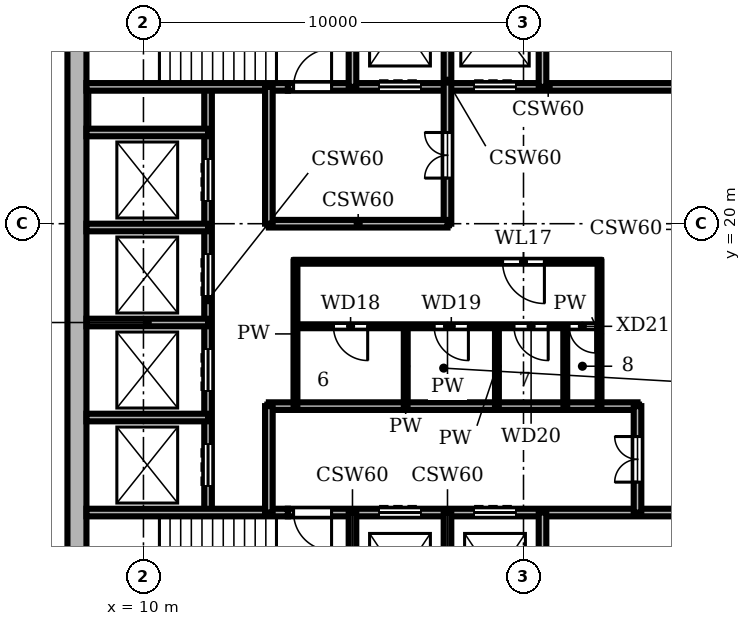
"""IFC4 building model, lengths in metres.
Left out: names, types, materials, properties, quantities, classifications, styles, units other than length and angle.
Written with IfcOpenShell. Run it as: python <this file> out.ifc"""

import sys

from ifc_helpers import new_model, si_unit, direction, frame, frame_2d, origin, place, context, subcontext, project, spatial, rectangle, extrude, element, fill, save


model = new_model("IFC4")
c1 = context("Model", 3, precision=1e-05, world=origin(), true_north=direction((0.0, 1.0)))
c2 = subcontext(c1, "Body", "Model", "MODEL_VIEW")
j1 = project(units=[si_unit("LENGTHUNIT", "METRE"), si_unit("PLANEANGLEUNIT", "RADIAN")], contexts=[c1])
p1 = place(None, origin())
s1 = spatial("IfcSite", under=j1, at=p1, CompositionType="ELEMENT")
p2 = place(p1, origin())
s2 = spatial("IfcBuilding", under=s1, at=p2, CompositionType="ELEMENT")
p3 = place(p2, frame((0.0, 0.0, 333.3)))
s3 = spatial("IfcBuildingStorey", under=s2, at=p3, CompositionType="ELEMENT", Elevation=333.3)
p4 = place(p3, frame((8.25, 27.5, 0.0), z_axis=(0.0, 0.0, 1.0), x_axis=(0.0, -1.0, 0.0)))
e1 = element("IfcWall", 1, at=p4, inside=s3, PredefinedType="SHEAR", context=c2, shape_type="SweptSolid", body=[
    extrude(rectangle(XDim=19.0, YDim=0.5, at=frame_2d((9.5, 0.0))), origin(), (0.0, 0.0, 1.0), 3.9),
])
p5 = place(p3, frame((8.5, 12.4, 0.0), z_axis=(0.0, 0.0, 1.0), x_axis=(1.0, 0.0, 0.0)))
e2 = element("IfcWall", 2, at=p5, inside=s3, PredefinedType="SHEAR", context=c2, shape_type="SweptSolid", body=[
    extrude(rectangle(XDim=5.3, YDim=0.2, at=frame_2d((2.65, 0.0))), origin(), (0.0, 0.0, 1.0), 3.58),
])
p6 = place(p3, frame((13.8, 12.4, 0.0), z_axis=(0.0, 0.0, 1.0), x_axis=(1.0, 0.0, 0.0)))
e3 = element("IfcWall", 3, at=p6, inside=s3, PredefinedType="SHEAR", context=c2, shape_type="SweptSolid", body=[
    extrude(rectangle(XDim=13.7, YDim=0.2, at=frame_2d((6.85, 0.0))), origin(), (0.0, 0.0, 1.0), 3.58),
])
p7 = place(p6, frame((2.4, 0.0, 0.0)))
e4 = element("IfcOpeningElement", 4, at=p7, cuts=e3, PredefinedType="OPENING", context=c2, shape_type="SweptSolid", body=[
    extrude(rectangle(XDim=1.1, YDim=2.1, at=frame_2d((0.55, 1.05))), frame((0.0, 0.11, 0.0), z_axis=(0.0, -1.0, 0.0), x_axis=(1.0, 0.0, 0.0)), (0.0, 0.0, 1.0), 0.22),
])
p8 = place(p6, frame((4.9, 0.0, 0.0)))
e5 = element("IfcOpeningElement", 5, at=p8, cuts=e3, PredefinedType="OPENING", context=c2, shape_type="SweptSolid", body=[
    extrude(rectangle(XDim=1.1, YDim=2.1, at=frame_2d((0.55, 1.05))), frame((0.0, 0.11, 0.0), z_axis=(0.0, -1.0, 0.0), x_axis=(1.0, 0.0, 0.0)), (0.0, 0.0, 1.0), 0.22),
])
p9 = place(p6, frame((0.15, 0.0, 0.0)))
e6 = element("IfcOpeningElement", 6, at=p9, cuts=e3, PredefinedType="OPENING", context=c2, shape_type="SweptSolid", body=[
    extrude(rectangle(XDim=1.0, YDim=2.1, at=frame_2d((0.5, 1.05))), frame((0.0, 0.11, 0.0), z_axis=(0.0, -1.0, 0.0), x_axis=(1.0, 0.0, 0.0)), (0.0, 0.0, 1.0), 0.22),
])
p10 = place(p3, frame((8.5, 14.9, 0.0), z_axis=(0.0, 0.0, 1.0), x_axis=(1.0, 0.0, 0.0)))
e7 = element("IfcWall", 7, at=p10, inside=s3, PredefinedType="SHEAR", context=c2, shape_type="SweptSolid", body=[
    extrude(rectangle(XDim=3.2, YDim=0.2, at=frame_2d((1.6, 0.0))), origin(), (0.0, 0.0, 1.0), 3.58),
])
p11 = place(p3, frame((13.3, 15.2, 0.0), z_axis=(0.0, 0.0, 1.0), x_axis=(1.0, 0.0, 0.0)))
e8 = element("IfcWall", 8, at=p11, inside=s3, PredefinedType="SHEAR", context=c2, shape_type="SweptSolid", body=[
    extrude(rectangle(XDim=9.7, YDim=0.2, at=frame_2d((4.85, 0.0))), origin(), (0.0, 0.0, 1.0), 3.58),
])
p12 = place(p3, frame((14.0, 17.3, 0.0), z_axis=(0.0, 0.0, 1.0), x_axis=(1.0, 0.0, 0.0)))
e9 = element("IfcWall", 9, at=p12, inside=s3, PredefinedType="PARTITIONING", context=c2, shape_type="SweptSolid", body=[
    extrude(rectangle(XDim=8.0, YDim=0.1, at=frame_2d((4.0, 0.0))), origin(), (0.0, 0.0, 1.0), 3.58),
])
p13 = place(p12, frame((1.0, 0.0, 0.0)))
e10 = element("IfcOpeningElement", 10, at=p13, cuts=e9, PredefinedType="OPENING", context=c2, shape_type="SweptSolid", body=[
    extrude(rectangle(XDim=0.9, YDim=2.1, at=frame_2d((0.45, 1.05))), frame((0.0, 0.06, 0.0), z_axis=(0.0, -1.0, 0.0), x_axis=(1.0, 0.0, 0.0)), (0.0, 0.0, 1.0), 0.12),
])
p14 = place(p12, frame((3.65, 0.0, 0.0)))
e11 = element("IfcOpeningElement", 11, at=p14, cuts=e9, PredefinedType="OPENING", context=c2, shape_type="SweptSolid", body=[
    extrude(rectangle(XDim=0.9, YDim=2.1, at=frame_2d((0.45, 1.05))), frame((0.0, 0.06, 0.0), z_axis=(0.0, -1.0, 0.0), x_axis=(1.0, 0.0, 0.0)), (0.0, 0.0, 1.0), 0.12),
])
p15 = place(p12, frame((5.75, 0.0, 0.0)))
e12 = element("IfcOpeningElement", 12, at=p15, cuts=e9, PredefinedType="OPENING", context=c2, shape_type="SweptSolid", body=[
    extrude(rectangle(XDim=0.9, YDim=2.1, at=frame_2d((0.45, 1.05))), frame((0.0, 0.06, 0.0), z_axis=(0.0, -1.0, 0.0), x_axis=(1.0, 0.0, 0.0)), (0.0, 0.0, 1.0), 0.12),
])
p16 = place(p12, frame((7.2, 0.0, 0.0)))
e13 = element("IfcOpeningElement", 13, at=p16, cuts=e9, PredefinedType="OPENING", context=c2, shape_type="SweptSolid", body=[
    extrude(rectangle(XDim=0.7, YDim=2.1, at=frame_2d((0.35, 1.05))), frame((0.0, 0.06, 0.0), z_axis=(0.0, -1.0, 0.0), x_axis=(1.0, 0.0, 0.0)), (0.0, 0.0, 1.0), 0.12),
])
p17 = place(p3, frame((8.5, 17.4, 0.0), z_axis=(0.0, 0.0, 1.0), x_axis=(1.0, 0.0, 0.0)))
e14 = element("IfcWall", 14, at=p17, inside=s3, PredefinedType="SHEAR", context=c2, shape_type="SweptSolid", body=[
    extrude(rectangle(XDim=3.2, YDim=0.2, at=frame_2d((1.6, 0.0))), origin(), (0.0, 0.0, 1.0), 3.58),
])
p18 = place(p3, frame((14.0, 19.0, 0.0), z_axis=(0.0, 0.0, 1.0), x_axis=(1.0, 0.0, 0.0)))
e15 = element("IfcWall", 15, at=p18, inside=s3, PredefinedType="PARTITIONING", context=c2, shape_type="SweptSolid", body=[
    extrude(rectangle(XDim=8.0, YDim=0.1, at=frame_2d((4.0, 0.0))), origin(), (0.0, 0.0, 1.0), 3.58),
])
p19 = place(p18, frame((5.45, 0.0, 0.0)))
e16 = element("IfcOpeningElement", 16, at=p19, cuts=e15, PredefinedType="OPENING", context=c2, shape_type="SweptSolid", body=[
    extrude(rectangle(XDim=1.1, YDim=2.1, at=frame_2d((0.55, 1.05))), frame((0.0, 0.06, 0.0), z_axis=(0.0, -1.0, 0.0), x_axis=(1.0, 0.0, 0.0)), (0.0, 0.0, 1.0), 0.12),
])
p20 = place(p3, frame((8.5, 19.9, 0.0), z_axis=(0.0, 0.0, 1.0), x_axis=(1.0, 0.0, 0.0)))
e17 = element("IfcWall", 17, at=p20, inside=s3, PredefinedType="SHEAR", context=c2, shape_type="SweptSolid", body=[
    extrude(rectangle(XDim=3.2, YDim=0.2, at=frame_2d((1.6, 0.0))), origin(), (0.0, 0.0, 1.0), 3.58),
])
p21 = place(p3, frame((13.3, 20.0, 0.0), z_axis=(0.0, 0.0, 1.0), x_axis=(1.0, 0.0, 0.0)))
e18 = element("IfcWall", 18, at=p21, inside=s3, PredefinedType="SHEAR", context=c2, shape_type="SweptSolid", body=[
    extrude(rectangle(XDim=4.7, YDim=0.2, at=frame_2d((2.35, 0.0))), origin(), (0.0, 0.0, 1.0), 3.58),
])
p22 = place(p3, frame((8.5, 22.4, 0.0), z_axis=(0.0, 0.0, 1.0), x_axis=(1.0, 0.0, 0.0)))
e19 = element("IfcWall", 19, at=p22, inside=s3, PredefinedType="SHEAR", context=c2, shape_type="SweptSolid", body=[
    extrude(rectangle(XDim=3.2, YDim=0.2, at=frame_2d((1.6, 0.0))), origin(), (0.0, 0.0, 1.0), 3.58),
])
p23 = place(p3, frame((8.5, 23.6, 0.0), z_axis=(0.0, 0.0, 1.0), x_axis=(1.0, 0.0, 0.0)))
e20 = element("IfcWall", 20, at=p23, inside=s3, PredefinedType="SHEAR", context=c2, shape_type="SweptSolid", body=[
    extrude(rectangle(XDim=5.3, YDim=0.2, at=frame_2d((2.65, 0.0))), origin(), (0.0, 0.0, 1.0), 3.58),
])
p24 = place(p3, frame((13.8, 23.6, 0.0), z_axis=(0.0, 0.0, 1.0), x_axis=(1.0, 0.0, 0.0)))
e21 = element("IfcWall", 21, at=p24, inside=s3, PredefinedType="SHEAR", context=c2, shape_type="SweptSolid", body=[
    extrude(rectangle(XDim=13.7, YDim=0.2, at=frame_2d((6.85, 0.0))), origin(), (0.0, 0.0, 1.0), 3.58),
])
p25 = place(p24, frame((2.4, 0.0, 0.0)))
e22 = element("IfcOpeningElement", 22, at=p25, cuts=e21, PredefinedType="OPENING", context=c2, shape_type="SweptSolid", body=[
    extrude(rectangle(XDim=1.1, YDim=2.1, at=frame_2d((0.55, 1.05))), frame((0.0, 0.11, 0.0), z_axis=(0.0, -1.0, 0.0), x_axis=(1.0, 0.0, 0.0)), (0.0, 0.0, 1.0), 0.22),
])
p26 = place(p24, frame((4.9, 0.0, 0.0)))
e23 = element("IfcOpeningElement", 23, at=p26, cuts=e21, PredefinedType="OPENING", context=c2, shape_type="SweptSolid", body=[
    extrude(rectangle(XDim=1.1, YDim=2.1, at=frame_2d((0.55, 1.05))), frame((0.0, 0.11, 0.0), z_axis=(0.0, -1.0, 0.0), x_axis=(1.0, 0.0, 0.0)), (0.0, 0.0, 1.0), 0.22),
])
p27 = place(p24, frame((0.15, 0.0, 0.0)))
e24 = element("IfcOpeningElement", 24, at=p27, cuts=e21, PredefinedType="OPENING", context=c2, shape_type="SweptSolid", body=[
    extrude(rectangle(XDim=1.0, YDim=2.1, at=frame_2d((0.5, 1.05))), frame((0.0, 0.11, 0.0), z_axis=(0.0, -1.0, 0.0), x_axis=(1.0, 0.0, 0.0)), (0.0, 0.0, 1.0), 0.22),
])
p28 = place(p3, frame((11.7, 12.4, 0.0), z_axis=(0.0, 0.0, 1.0), x_axis=(0.0, 1.0, 0.0)))
e25 = element("IfcWall", 25, at=p28, inside=s3, PredefinedType="SHEAR", context=c2, shape_type="SweptSolid", body=[
    extrude(rectangle(XDim=11.2, YDim=0.2, at=frame_2d((5.6, 0.0))), origin(), (0.0, 0.0, 1.0), 3.58),
])
p29 = place(p28, frame((0.7, 0.0, 0.0)))
e26 = element("IfcOpeningElement", 26, at=p29, cuts=e25, PredefinedType="OPENING", context=c2, shape_type="SweptSolid", body=[
    extrude(rectangle(XDim=1.1, YDim=2.1, at=frame_2d((0.55, 1.05))), frame((0.0, 0.11, 0.0), z_axis=(0.0, -1.0, 0.0), x_axis=(1.0, 0.0, 0.0)), (0.0, 0.0, 1.0), 0.22),
])
p30 = place(p28, frame((3.2, 0.0, 0.0)))
e27 = element("IfcOpeningElement", 27, at=p30, cuts=e25, PredefinedType="OPENING", context=c2, shape_type="SweptSolid", body=[
    extrude(rectangle(XDim=1.1, YDim=2.1, at=frame_2d((0.55, 1.05))), frame((0.0, 0.11, 0.0), z_axis=(0.0, -1.0, 0.0), x_axis=(1.0, 0.0, 0.0)), (0.0, 0.0, 1.0), 0.22),
])
p31 = place(p28, frame((5.7, 0.0, 0.0)))
e28 = element("IfcOpeningElement", 28, at=p31, cuts=e25, PredefinedType="OPENING", context=c2, shape_type="SweptSolid", body=[
    extrude(rectangle(XDim=1.1, YDim=2.1, at=frame_2d((0.55, 1.05))), frame((0.0, 0.11, 0.0), z_axis=(0.0, -1.0, 0.0), x_axis=(1.0, 0.0, 0.0)), (0.0, 0.0, 1.0), 0.22),
])
p32 = place(p28, frame((8.2, 0.0, 0.0)))
e29 = element("IfcOpeningElement", 29, at=p32, cuts=e25, PredefinedType="OPENING", context=c2, shape_type="SweptSolid", body=[
    extrude(rectangle(XDim=1.1, YDim=2.1, at=frame_2d((0.55, 1.05))), frame((0.0, 0.11, 0.0), z_axis=(0.0, -1.0, 0.0), x_axis=(1.0, 0.0, 0.0)), (0.0, 0.0, 1.0), 0.22),
])
p33 = place(p3, frame((13.3, 12.4, 0.0), z_axis=(0.0, 0.0, 1.0), x_axis=(0.0, 1.0, 0.0)))
e30 = element("IfcWall", 30, at=p33, inside=s3, PredefinedType="SHEAR", context=c2, shape_type="SweptSolid", body=[
    extrude(rectangle(XDim=2.8, YDim=0.2, at=frame_2d((1.4, 0.0))), origin(), (0.0, 0.0, 1.0), 3.58),
])
p34 = place(p3, frame((13.3, 20.0, 0.0), z_axis=(0.0, 0.0, 1.0), x_axis=(0.0, 1.0, 0.0)))
e31 = element("IfcWall", 31, at=p34, inside=s3, PredefinedType="SHEAR", context=c2, shape_type="SweptSolid", body=[
    extrude(rectangle(XDim=3.6, YDim=0.2, at=frame_2d((1.8, 0.0))), origin(), (0.0, 0.0, 1.0), 3.58),
])
p35 = place(p3, frame((14.0, 15.2, 0.0), z_axis=(0.0, 0.0, 1.0), x_axis=(0.0, 1.0, 0.0)))
e32 = element("IfcWall", 32, at=p35, inside=s3, PredefinedType="PARTITIONING", context=c2, shape_type="SweptSolid", body=[
    extrude(rectangle(XDim=3.8, YDim=0.1, at=frame_2d((1.9, 0.0))), origin(), (0.0, 0.0, 1.0), 3.58),
])
for number, where, z_axis, x_axis in (
    (33, (15.5, 8.5, 0.0), (0.0, 0.0, 1.0), (0.0, 1.0, 0.0)),
    (34, (15.5, 23.6, 0.0), (0.0, 0.0, 1.0), (0.0, 1.0, 0.0)),
):
    element("IfcWall", number, at=place(p3, frame(where, z_axis=z_axis, x_axis=x_axis)), inside=s3, PredefinedType="SHEAR", context=c2, shape_type="SweptSolid", body=[
        extrude(rectangle(XDim=3.9, YDim=0.2, at=frame_2d((1.95, 0.0))), origin(), (0.0, 0.0, 1.0), 3.58),
    ])
p36 = place(p3, frame((16.9, 15.2, 0.0), z_axis=(0.0, 0.0, 1.0), x_axis=(0.0, 1.0, 0.0)))
e35 = element("IfcWall", 35, at=p36, inside=s3, PredefinedType="PARTITIONING", context=c2, shape_type="SweptSolid", body=[
    extrude(rectangle(XDim=2.1, YDim=0.1, at=frame_2d((1.05, 0.0))), origin(), (0.0, 0.0, 1.0), 3.58),
])
p37 = place(p3, frame((18.0, 8.5, 0.0), z_axis=(0.0, 0.0, 1.0), x_axis=(0.0, 1.0, 0.0)))
e36 = element("IfcWall", 36, at=p37, inside=s3, PredefinedType="SHEAR", context=c2, shape_type="SweptSolid", body=[
    extrude(rectangle(XDim=3.9, YDim=0.2, at=frame_2d((1.95, 0.0))), origin(), (0.0, 0.0, 1.0), 3.58),
])
p38 = place(p3, frame((18.0, 20.0, 0.0), z_axis=(0.0, 0.0, 1.0), x_axis=(0.0, 1.0, 0.0)))
e37 = element("IfcWall", 37, at=p38, inside=s3, PredefinedType="SHEAR", context=c2, shape_type="SweptSolid", body=[
    extrude(rectangle(XDim=7.5, YDim=0.2, at=frame_2d((3.75, 0.0))), origin(), (0.0, 0.0, 1.0), 3.58),
])
p39 = place(p38, frame((1.2, 0.0, 0.0)))
e38 = element("IfcOpeningElement", 38, at=p39, cuts=e37, PredefinedType="OPENING", context=c2, shape_type="SweptSolid", body=[
    extrude(rectangle(XDim=1.2, YDim=2.1, at=frame_2d((0.6, 1.05))), frame((0.0, 0.11, 0.0), z_axis=(0.0, -1.0, 0.0), x_axis=(1.0, 0.0, 0.0)), (0.0, 0.0, 1.0), 0.22),
])
p40 = place(p3, frame((19.3, 15.2, 0.0), z_axis=(0.0, 0.0, 1.0), x_axis=(0.0, 1.0, 0.0)))
e39 = element("IfcWall", 39, at=p40, inside=s3, PredefinedType="PARTITIONING", context=c2, shape_type="SweptSolid", body=[
    extrude(rectangle(XDim=2.1, YDim=0.1, at=frame_2d((1.05, 0.0))), origin(), (0.0, 0.0, 1.0), 3.58),
])
for number, where, z_axis, x_axis in (
    (40, (20.5, 8.5, 0.0), (0.0, 0.0, 1.0), (0.0, 1.0, 0.0)),
    (41, (20.5, 23.6, 0.0), (0.0, 0.0, 1.0), (0.0, 1.0, 0.0)),
):
    element("IfcWall", number, at=place(p3, frame(where, z_axis=z_axis, x_axis=x_axis)), inside=s3, PredefinedType="SHEAR", context=c2, shape_type="SweptSolid", body=[
        extrude(rectangle(XDim=3.9, YDim=0.2, at=frame_2d((1.95, 0.0))), origin(), (0.0, 0.0, 1.0), 3.58),
    ])
p41 = place(p3, frame((21.1, 15.2, 0.0), z_axis=(0.0, 0.0, 1.0), x_axis=(0.0, 1.0, 0.0)))
e42 = element("IfcWall", 42, at=p41, inside=s3, PredefinedType="PARTITIONING", context=c2, shape_type="SweptSolid", body=[
    extrude(rectangle(XDim=2.1, YDim=0.1, at=frame_2d((1.05, 0.0))), origin(), (0.0, 0.0, 1.0), 3.58),
])
p42 = place(p3, frame((22.0, 15.2, 0.0), z_axis=(0.0, 0.0, 1.0), x_axis=(0.0, 1.0, 0.0)))
e43 = element("IfcWall", 43, at=p42, inside=s3, PredefinedType="PARTITIONING", context=c2, shape_type="SweptSolid", body=[
    extrude(rectangle(XDim=3.8, YDim=0.1, at=frame_2d((1.9, 0.0))), origin(), (0.0, 0.0, 1.0), 3.58),
])
p43 = place(p3, frame((23.0, 12.4, 0.0), z_axis=(0.0, 0.0, 1.0), x_axis=(0.0, 1.0, 0.0)))
e44 = element("IfcWall", 44, at=p43, inside=s3, PredefinedType="SHEAR", context=c2, shape_type="SweptSolid", body=[
    extrude(rectangle(XDim=2.8, YDim=0.2, at=frame_2d((1.4, 0.0))), origin(), (0.0, 0.0, 1.0), 3.58),
])
p44 = place(p43, frame((0.8, 0.0, 0.0)))
e45 = element("IfcOpeningElement", 45, at=p44, cuts=e44, PredefinedType="OPENING", context=c2, shape_type="SweptSolid", body=[
    extrude(rectangle(XDim=1.2, YDim=2.1, at=frame_2d((0.6, 1.05))), frame((0.0, 0.11, 0.0), z_axis=(0.0, -1.0, 0.0), x_axis=(1.0, 0.0, 0.0)), (0.0, 0.0, 1.0), 0.22),
])
p45 = place(p29, origin())
e46 = element("IfcDoor", 46, at=p45, inside=s3, OperationType="DOUBLE_DOOR_SLIDING", PredefinedType="DOOR", context=c2, shape_type="SweptSolid", body=[
    extrude(rectangle(XDim=1.1, YDim=2.1, at=frame_2d((0.55, 1.05))), frame((0.0, 0.025, 0.0), z_axis=(0.0, -1.0, 0.0), x_axis=(1.0, 0.0, 0.0)), (0.0, 0.0, 1.0), 0.05),
])
fill(e26, e46)
p46 = place(p30, origin())
e47 = element("IfcDoor", 47, at=p46, inside=s3, OperationType="DOUBLE_DOOR_SLIDING", PredefinedType="DOOR", context=c2, shape_type="SweptSolid", body=[
    extrude(rectangle(XDim=1.1, YDim=2.1, at=frame_2d((0.55, 1.05))), frame((0.0, 0.025, 0.0), z_axis=(0.0, -1.0, 0.0), x_axis=(1.0, 0.0, 0.0)), (0.0, 0.0, 1.0), 0.05),
])
fill(e27, e47)
p47 = place(p31, origin())
e48 = element("IfcDoor", 48, at=p47, inside=s3, OperationType="DOUBLE_DOOR_SLIDING", PredefinedType="DOOR", context=c2, shape_type="SweptSolid", body=[
    extrude(rectangle(XDim=1.1, YDim=2.1, at=frame_2d((0.55, 1.05))), frame((0.0, 0.025, 0.0), z_axis=(0.0, -1.0, 0.0), x_axis=(1.0, 0.0, 0.0)), (0.0, 0.0, 1.0), 0.05),
])
fill(e28, e48)
p48 = place(p32, origin())
e49 = element("IfcDoor", 49, at=p48, inside=s3, OperationType="DOUBLE_DOOR_SLIDING", PredefinedType="DOOR", context=c2, shape_type="SweptSolid", body=[
    extrude(rectangle(XDim=1.1, YDim=2.1, at=frame_2d((0.55, 1.05))), frame((0.0, 0.025, 0.0), z_axis=(0.0, -1.0, 0.0), x_axis=(1.0, 0.0, 0.0)), (0.0, 0.0, 1.0), 0.05),
])
fill(e29, e49)
p49 = place(p7, origin())
e50 = element("IfcDoor", 50, at=p49, inside=s3, OperationType="DOUBLE_DOOR_SLIDING", PredefinedType="DOOR", context=c2, shape_type="SweptSolid", body=[
    extrude(rectangle(XDim=1.1, YDim=2.1, at=frame_2d((0.55, 1.05))), frame((0.0, 0.025, 0.0), z_axis=(0.0, -1.0, 0.0), x_axis=(1.0, 0.0, 0.0)), (0.0, 0.0, 1.0), 0.05),
])
fill(e4, e50)
p50 = place(p8, origin())
e51 = element("IfcDoor", 51, at=p50, inside=s3, OperationType="DOUBLE_DOOR_SLIDING", PredefinedType="DOOR", context=c2, shape_type="SweptSolid", body=[
    extrude(rectangle(XDim=1.1, YDim=2.1, at=frame_2d((0.55, 1.05))), frame((0.0, 0.025, 0.0), z_axis=(0.0, -1.0, 0.0), x_axis=(1.0, 0.0, 0.0)), (0.0, 0.0, 1.0), 0.05),
])
fill(e5, e51)
p51 = place(p25, origin())
e52 = element("IfcDoor", 52, at=p51, inside=s3, OperationType="DOUBLE_DOOR_SLIDING", PredefinedType="DOOR", context=c2, shape_type="SweptSolid", body=[
    extrude(rectangle(XDim=1.1, YDim=2.1, at=frame_2d((0.55, 1.05))), frame((0.0, 0.025, 0.0), z_axis=(0.0, -1.0, 0.0), x_axis=(1.0, 0.0, 0.0)), (0.0, 0.0, 1.0), 0.05),
])
fill(e22, e52)
p52 = place(p26, origin())
e53 = element("IfcDoor", 53, at=p52, inside=s3, OperationType="DOUBLE_DOOR_SLIDING", PredefinedType="DOOR", context=c2, shape_type="SweptSolid", body=[
    extrude(rectangle(XDim=1.1, YDim=2.1, at=frame_2d((0.55, 1.05))), frame((0.0, 0.025, 0.0), z_axis=(0.0, -1.0, 0.0), x_axis=(1.0, 0.0, 0.0)), (0.0, 0.0, 1.0), 0.05),
])
fill(e23, e53)
p53 = place(p9, frame((1.0, 0.0, 0.0), z_axis=(0.0, 0.0, 1.0), x_axis=(-1.0, 0.0, 0.0)))
e54 = element("IfcDoor", 54, at=p53, inside=s3, OperationType="SINGLE_SWING_LEFT", PredefinedType="DOOR", context=c2, shape_type="SweptSolid", body=[
    extrude(rectangle(XDim=1.0, YDim=2.1, at=frame_2d((0.5, 1.05))), frame((0.0, 0.025, 0.0), z_axis=(0.0, -1.0, 0.0), x_axis=(1.0, 0.0, 0.0)), (0.0, 0.0, 1.0), 0.05),
])
fill(e6, e54)
p54 = place(p27, origin())
e55 = element("IfcDoor", 55, at=p54, inside=s3, OperationType="SINGLE_SWING_RIGHT", PredefinedType="DOOR", context=c2, shape_type="SweptSolid", body=[
    extrude(rectangle(XDim=1.0, YDim=2.1, at=frame_2d((0.5, 1.05))), frame((0.0, 0.025, 0.0), z_axis=(0.0, -1.0, 0.0), x_axis=(1.0, 0.0, 0.0)), (0.0, 0.0, 1.0), 0.05),
])
fill(e24, e55)
p55 = place(p44, origin())
e56 = element("IfcDoor", 56, at=p55, inside=s3, OperationType="DOUBLE_DOOR_SINGLE_SWING", PredefinedType="DOOR", context=c2, shape_type="SweptSolid", body=[
    extrude(rectangle(XDim=1.2, YDim=2.1, at=frame_2d((0.6, 1.05))), frame((0.0, 0.025, 0.0), z_axis=(0.0, -1.0, 0.0), x_axis=(1.0, 0.0, 0.0)), (0.0, 0.0, 1.0), 0.05),
])
fill(e45, e56)
p56 = place(p39, origin())
e57 = element("IfcDoor", 57, at=p56, inside=s3, OperationType="DOUBLE_DOOR_SINGLE_SWING", PredefinedType="DOOR", context=c2, shape_type="SweptSolid", body=[
    extrude(rectangle(XDim=1.2, YDim=2.1, at=frame_2d((0.6, 1.05))), frame((0.0, 0.025, 0.0), z_axis=(0.0, -1.0, 0.0), x_axis=(1.0, 0.0, 0.0)), (0.0, 0.0, 1.0), 0.05),
])
fill(e38, e57)
p57 = place(p19, frame((1.1, 0.0, 0.0), z_axis=(0.0, 0.0, 1.0), x_axis=(-1.0, 0.0, 0.0)))
e58 = element("IfcDoor", 58, at=p57, inside=s3, OperationType="SINGLE_SWING_LEFT", PredefinedType="DOOR", context=c2, shape_type="SweptSolid", body=[
    extrude(rectangle(XDim=1.1, YDim=2.1, at=frame_2d((0.55, 1.05))), frame((0.0, 0.025, 0.0), z_axis=(0.0, -1.0, 0.0), x_axis=(1.0, 0.0, 0.0)), (0.0, 0.0, 1.0), 0.05),
])
fill(e16, e58)
p58 = place(p13, frame((0.9, 0.0, 0.0), z_axis=(0.0, 0.0, 1.0), x_axis=(-1.0, 0.0, 0.0)))
e59 = element("IfcDoor", 59, at=p58, inside=s3, OperationType="SINGLE_SWING_LEFT", PredefinedType="DOOR", context=c2, shape_type="SweptSolid", body=[
    extrude(rectangle(XDim=0.9, YDim=2.1, at=frame_2d((0.45, 1.05))), frame((0.0, 0.025, 0.0), z_axis=(0.0, -1.0, 0.0), x_axis=(1.0, 0.0, 0.0)), (0.0, 0.0, 1.0), 0.05),
])
fill(e10, e59)
p59 = place(p14, frame((0.9, 0.0, 0.0), z_axis=(0.0, 0.0, 1.0), x_axis=(-1.0, 0.0, 0.0)))
e60 = element("IfcDoor", 60, at=p59, inside=s3, OperationType="SINGLE_SWING_LEFT", PredefinedType="DOOR", context=c2, shape_type="SweptSolid", body=[
    extrude(rectangle(XDim=0.9, YDim=2.1, at=frame_2d((0.45, 1.05))), frame((0.0, 0.025, 0.0), z_axis=(0.0, -1.0, 0.0), x_axis=(1.0, 0.0, 0.0)), (0.0, 0.0, 1.0), 0.05),
])
fill(e11, e60)
p60 = place(p15, frame((0.9, 0.0, 0.0), z_axis=(0.0, 0.0, 1.0), x_axis=(-1.0, 0.0, 0.0)))
e61 = element("IfcDoor", 61, at=p60, inside=s3, OperationType="SINGLE_SWING_LEFT", PredefinedType="DOOR", context=c2, shape_type="SweptSolid", body=[
    extrude(rectangle(XDim=0.9, YDim=2.1, at=frame_2d((0.45, 1.05))), frame((0.0, 0.025, 0.0), z_axis=(0.0, -1.0, 0.0), x_axis=(1.0, 0.0, 0.0)), (0.0, 0.0, 1.0), 0.05),
])
fill(e12, e61)
p61 = place(p16, frame((0.7, 0.0, 0.0), z_axis=(0.0, 0.0, 1.0), x_axis=(-1.0, 0.0, 0.0)))
e62 = element("IfcDoor", 62, at=p61, inside=s3, OperationType="SINGLE_SWING_LEFT", PredefinedType="DOOR", context=c2, shape_type="SweptSolid", body=[
    extrude(rectangle(XDim=0.7, YDim=2.1, at=frame_2d((0.35, 1.05))), frame((0.0, 0.025, 0.0), z_axis=(0.0, -1.0, 0.0), x_axis=(1.0, 0.0, 0.0)), (0.0, 0.0, 1.0), 0.05),
])
fill(e13, e62)
save(model, sys.argv[1])
